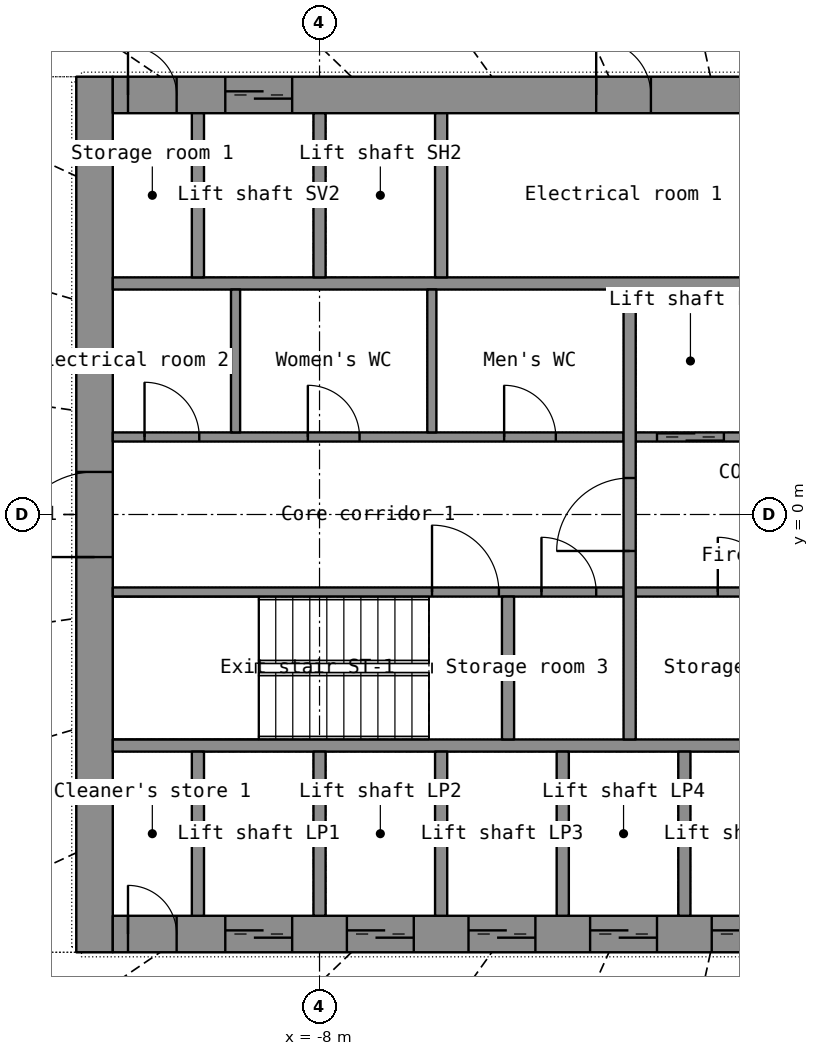
"""IFC4 building model, lengths in metres.
Left out: names, types, materials, properties, quantities, classifications, styles, units other than length and angle.
Written with IfcOpenShell. Run it as: python <this file> out.ifc"""

import sys

from ifc_helpers import new_model, si_unit, direction, frame, frame_2d, origin, place, context, subcontext, project, spatial, rectangle, extrude, element, fill, save


model = new_model("IFC4")
c1 = context("Model", 3, precision=1e-05, world=origin(), true_north=direction((0.0, 1.0)))
c2 = subcontext(c1, "Body", "Model", "MODEL_VIEW")
j1 = project(units=[si_unit("LENGTHUNIT", "METRE"), si_unit("PLANEANGLEUNIT", "RADIAN")], contexts=[c1])
p1 = place(None, origin())
s1 = spatial("IfcSite", under=j1, at=p1, CompositionType="ELEMENT")
p2 = place(p1, origin())
s2 = spatial("IfcBuilding", under=s1, at=p2, CompositionType="ELEMENT")
p3 = place(p2, frame((0.0, 0.0, 74.1)))
s3 = spatial("IfcBuildingStorey", under=s2, at=p3, CompositionType="ELEMENT", Elevation=74.1)
p4 = place(p3, frame((-11.7, -7.2, 0.0), z_axis=(0.0, 0.0, 1.0), x_axis=(0.0, 1.0, 0.0)))
e1 = element("IfcWall", 1, at=p4, inside=s3, PredefinedType="SHEAR", context=c2, shape_type="SweptSolid", body=[
    extrude(rectangle(XDim=14.4, YDim=0.6, at=frame_2d((7.2, 0.0))), origin(), (0.0, 0.0, 1.0), 3.3),
])
p5 = place(p4, frame((6.5, 0.0, 0.0)))
e2 = element("IfcOpeningElement", 2, at=p5, cuts=e1, PredefinedType="OPENING", context=c2, shape_type="SweptSolid", body=[
    extrude(rectangle(XDim=1.4, YDim=2.2, at=frame_2d((0.7, 1.1))), frame((0.0, 0.31, 0.0), z_axis=(0.0, -1.0, 0.0), x_axis=(1.0, 0.0, 0.0)), (0.0, 0.0, 1.0), 0.62),
])
p6 = place(p3, frame((-11.4, -6.9, 0.0), z_axis=(0.0, 0.0, 1.0), x_axis=(1.0, 0.0, 0.0)))
e3 = element("IfcWall", 3, at=p6, inside=s3, PredefinedType="SHEAR", context=c2, shape_type="SweptSolid", body=[
    extrude(rectangle(XDim=22.8, YDim=0.6, at=frame_2d((11.4, 0.0))), origin(), (0.0, 0.0, 1.0), 3.3),
])
p7 = place(p6, frame((1.85, 0.0, 0.0)))
e4 = element("IfcOpeningElement", 4, at=p7, cuts=e3, PredefinedType="OPENING", context=c2, shape_type="SweptSolid", body=[
    extrude(rectangle(XDim=1.1, YDim=2.2, at=frame_2d((0.55, 1.1))), frame((0.0, 0.31, 0.0), z_axis=(0.0, -1.0, 0.0), x_axis=(1.0, 0.0, 0.0)), (0.0, 0.0, 1.0), 0.62),
])
p8 = place(p6, frame((3.85, 0.0, 0.0)))
e5 = element("IfcOpeningElement", 5, at=p8, cuts=e3, PredefinedType="OPENING", context=c2, shape_type="SweptSolid", body=[
    extrude(rectangle(XDim=1.1, YDim=2.2, at=frame_2d((0.55, 1.1))), frame((0.0, 0.31, 0.0), z_axis=(0.0, -1.0, 0.0), x_axis=(1.0, 0.0, 0.0)), (0.0, 0.0, 1.0), 0.62),
])
p9 = place(p6, frame((5.85, 0.0, 0.0)))
e6 = element("IfcOpeningElement", 6, at=p9, cuts=e3, PredefinedType="OPENING", context=c2, shape_type="SweptSolid", body=[
    extrude(rectangle(XDim=1.1, YDim=2.2, at=frame_2d((0.55, 1.1))), frame((0.0, 0.31, 0.0), z_axis=(0.0, -1.0, 0.0), x_axis=(1.0, 0.0, 0.0)), (0.0, 0.0, 1.0), 0.62),
])
p10 = place(p6, frame((7.85, 0.0, 0.0)))
e7 = element("IfcOpeningElement", 7, at=p10, cuts=e3, PredefinedType="OPENING", context=c2, shape_type="SweptSolid", body=[
    extrude(rectangle(XDim=1.1, YDim=2.2, at=frame_2d((0.55, 1.1))), frame((0.0, 0.31, 0.0), z_axis=(0.0, -1.0, 0.0), x_axis=(1.0, 0.0, 0.0)), (0.0, 0.0, 1.0), 0.62),
])
p11 = place(p6, frame((9.85, 0.0, 0.0)))
e8 = element("IfcOpeningElement", 8, at=p11, cuts=e3, PredefinedType="OPENING", context=c2, shape_type="SweptSolid", body=[
    extrude(rectangle(XDim=1.1, YDim=2.2, at=frame_2d((0.55, 1.1))), frame((0.0, 0.31, 0.0), z_axis=(0.0, -1.0, 0.0), x_axis=(1.0, 0.0, 0.0)), (0.0, 0.0, 1.0), 0.62),
])
p12 = place(p6, frame((11.85, 0.0, 0.0)))
e9 = element("IfcOpeningElement", 9, at=p12, cuts=e3, PredefinedType="OPENING", context=c2, shape_type="SweptSolid", body=[
    extrude(rectangle(XDim=1.1, YDim=2.2, at=frame_2d((0.55, 1.1))), frame((0.0, 0.31, 0.0), z_axis=(0.0, -1.0, 0.0), x_axis=(1.0, 0.0, 0.0)), (0.0, 0.0, 1.0), 0.62),
])
p13 = place(p6, frame((13.85, 0.0, 0.0)))
e10 = element("IfcOpeningElement", 10, at=p13, cuts=e3, PredefinedType="OPENING", context=c2, shape_type="SweptSolid", body=[
    extrude(rectangle(XDim=1.1, YDim=2.2, at=frame_2d((0.55, 1.1))), frame((0.0, 0.31, 0.0), z_axis=(0.0, -1.0, 0.0), x_axis=(1.0, 0.0, 0.0)), (0.0, 0.0, 1.0), 0.62),
])
p14 = place(p6, frame((15.85, 0.0, 0.0)))
e11 = element("IfcOpeningElement", 11, at=p14, cuts=e3, PredefinedType="OPENING", context=c2, shape_type="SweptSolid", body=[
    extrude(rectangle(XDim=1.1, YDim=2.2, at=frame_2d((0.55, 1.1))), frame((0.0, 0.31, 0.0), z_axis=(0.0, -1.0, 0.0), x_axis=(1.0, 0.0, 0.0)), (0.0, 0.0, 1.0), 0.62),
])
p15 = place(p6, frame((19.85, 0.0, 0.0)))
e12 = element("IfcOpeningElement", 12, at=p15, cuts=e3, PredefinedType="OPENING", context=c2, shape_type="SweptSolid", body=[
    extrude(rectangle(XDim=1.1, YDim=2.2, at=frame_2d((0.55, 1.1))), frame((0.0, 0.31, 0.0), z_axis=(0.0, -1.0, 0.0), x_axis=(1.0, 0.0, 0.0)), (0.0, 0.0, 1.0), 0.62),
])
p16 = place(p6, frame((0.25, 0.0, 0.0)))
e13 = element("IfcOpeningElement", 13, at=p16, cuts=e3, PredefinedType="OPENING", context=c2, shape_type="SweptSolid", body=[
    extrude(rectangle(XDim=0.8, YDim=2.05, at=frame_2d((0.4, 1.025))), frame((0.0, 0.31, 0.0), z_axis=(0.0, -1.0, 0.0), x_axis=(1.0, 0.0, 0.0)), (0.0, 0.0, 1.0), 0.62),
])
p17 = place(p6, frame((21.75, 0.0, 0.0)))
e14 = element("IfcOpeningElement", 14, at=p17, cuts=e3, PredefinedType="OPENING", context=c2, shape_type="SweptSolid", body=[
    extrude(rectangle(XDim=0.8, YDim=2.05, at=frame_2d((0.4, 1.025))), frame((0.0, 0.31, 0.0), z_axis=(0.0, -1.0, 0.0), x_axis=(1.0, 0.0, 0.0)), (0.0, 0.0, 1.0), 0.62),
])
p18 = place(p3, frame((-11.4, 6.9, 0.0), z_axis=(0.0, 0.0, 1.0), x_axis=(1.0, 0.0, 0.0)))
e15 = element("IfcWall", 15, at=p18, inside=s3, PredefinedType="SHEAR", context=c2, shape_type="SweptSolid", body=[
    extrude(rectangle(XDim=22.8, YDim=0.6, at=frame_2d((11.4, 0.0))), origin(), (0.0, 0.0, 1.0), 3.3),
])
p19 = place(p18, frame((1.85, 0.0, 0.0)))
e16 = element("IfcOpeningElement", 16, at=p19, cuts=e15, PredefinedType="OPENING", context=c2, shape_type="SweptSolid", body=[
    extrude(rectangle(XDim=1.1, YDim=2.2, at=frame_2d((0.55, 1.1))), frame((0.0, 0.31, 0.0), z_axis=(0.0, -1.0, 0.0), x_axis=(1.0, 0.0, 0.0)), (0.0, 0.0, 1.0), 0.62),
])
p20 = place(p18, frame((7.95, 0.0, 0.0)))
e17 = element("IfcOpeningElement", 17, at=p20, cuts=e15, PredefinedType="OPENING", context=c2, shape_type="SweptSolid", body=[
    extrude(rectangle(XDim=0.9, YDim=2.1, at=frame_2d((0.45, 1.05))), frame((0.0, 0.31, 0.0), z_axis=(0.0, -1.0, 0.0), x_axis=(1.0, 0.0, 0.0)), (0.0, 0.0, 1.0), 0.62),
])
p21 = place(p18, frame((13.95, 0.0, 0.0)))
e18 = element("IfcOpeningElement", 18, at=p21, cuts=e15, PredefinedType="OPENING", context=c2, shape_type="SweptSolid", body=[
    extrude(rectangle(XDim=0.9, YDim=2.1, at=frame_2d((0.45, 1.05))), frame((0.0, 0.31, 0.0), z_axis=(0.0, -1.0, 0.0), x_axis=(1.0, 0.0, 0.0)), (0.0, 0.0, 1.0), 0.62),
])
p22 = place(p18, frame((18.95, 0.0, 0.0)))
e19 = element("IfcOpeningElement", 19, at=p22, cuts=e15, PredefinedType="OPENING", context=c2, shape_type="SweptSolid", body=[
    extrude(rectangle(XDim=0.9, YDim=2.1, at=frame_2d((0.45, 1.05))), frame((0.0, 0.31, 0.0), z_axis=(0.0, -1.0, 0.0), x_axis=(1.0, 0.0, 0.0)), (0.0, 0.0, 1.0), 0.62),
])
p23 = place(p18, frame((0.25, 0.0, 0.0)))
e20 = element("IfcOpeningElement", 20, at=p23, cuts=e15, PredefinedType="OPENING", context=c2, shape_type="SweptSolid", body=[
    extrude(rectangle(XDim=0.8, YDim=2.05, at=frame_2d((0.4, 1.025))), frame((0.0, 0.31, 0.0), z_axis=(0.0, -1.0, 0.0), x_axis=(1.0, 0.0, 0.0)), (0.0, 0.0, 1.0), 0.62),
])
p24 = place(p18, frame((21.75, 0.0, 0.0)))
e21 = element("IfcOpeningElement", 21, at=p24, cuts=e15, PredefinedType="OPENING", context=c2, shape_type="SweptSolid", body=[
    extrude(rectangle(XDim=0.8, YDim=2.05, at=frame_2d((0.4, 1.025))), frame((0.0, 0.31, 0.0), z_axis=(0.0, -1.0, 0.0), x_axis=(1.0, 0.0, 0.0)), (0.0, 0.0, 1.0), 0.62),
])
for number, where, z_axis, x_axis in (
    (22, (-11.4, -3.8, 0.0), (0.0, 0.0, 1.0), (1.0, 0.0, 0.0)),
    (23, (-11.4, 3.8, 0.0), (0.0, 0.0, 1.0), (1.0, 0.0, 0.0)),
):
    element("IfcWall", number, at=place(p3, frame(where, z_axis=z_axis, x_axis=x_axis)), inside=s3, PredefinedType="SHEAR", context=c2, shape_type="SweptSolid", body=[
        extrude(rectangle(XDim=22.8, YDim=0.2, at=frame_2d((11.4, 0.0))), origin(), (0.0, 0.0, 1.0), 3.3),
    ])
for number, where, z_axis, x_axis in (
    (24, (-10.0, -6.6, 0.0), (0.0, 0.0, 1.0), (0.0, 1.0, 0.0)),
    (25, (-8.0, -6.6, 0.0), (0.0, 0.0, 1.0), (0.0, 1.0, 0.0)),
    (26, (-6.0, -6.6, 0.0), (0.0, 0.0, 1.0), (0.0, 1.0, 0.0)),
    (27, (-4.0, -6.6, 0.0), (0.0, 0.0, 1.0), (0.0, 1.0, 0.0)),
    (28, (-2.0, -6.6, 0.0), (0.0, 0.0, 1.0), (0.0, 1.0, 0.0)),
    (29, (-10.0, 3.9, 0.0), (0.0, 0.0, 1.0), (0.0, 1.0, 0.0)),
    (30, (-8.0, 3.9, 0.0), (0.0, 0.0, 1.0), (0.0, 1.0, 0.0)),
    (31, (-6.0, 3.9, 0.0), (0.0, 0.0, 1.0), (0.0, 1.0, 0.0)),
):
    element("IfcWall", number, at=place(p3, frame(where, z_axis=z_axis, x_axis=x_axis)), inside=s3, PredefinedType="SHEAR", context=c2, shape_type="SweptSolid", body=[
        extrude(rectangle(XDim=2.7, YDim=0.2, at=frame_2d((1.35, 0.0))), origin(), (0.0, 0.0, 1.0), 3.3),
    ])
p25 = place(p3, frame((-11.4, -1.275, 0.0), z_axis=(0.0, 0.0, 1.0), x_axis=(1.0, 0.0, 0.0)))
e32 = element("IfcWall", 32, at=p25, inside=s3, PredefinedType="SHEAR", context=c2, shape_type="SweptSolid", body=[
    extrude(rectangle(XDim=8.4, YDim=0.15, at=frame_2d((4.2, 0.0))), origin(), (0.0, 0.0, 1.0), 3.3),
])
p26 = place(p25, frame((5.25, 0.0, 0.0)))
e33 = element("IfcOpeningElement", 33, at=p26, cuts=e32, PredefinedType="OPENING", context=c2, shape_type="SweptSolid", body=[
    extrude(rectangle(XDim=1.1, YDim=2.15, at=frame_2d((0.55, 1.075))), frame((0.0, 0.085, 0.0), z_axis=(0.0, -1.0, 0.0), x_axis=(1.0, 0.0, 0.0)), (0.0, 0.0, 1.0), 0.17),
])
p27 = place(p25, frame((7.05, 0.0, 0.0)))
e34 = element("IfcOpeningElement", 34, at=p27, cuts=e32, PredefinedType="OPENING", context=c2, shape_type="SweptSolid", body=[
    extrude(rectangle(XDim=0.9, YDim=2.1, at=frame_2d((0.45, 1.05))), frame((0.0, 0.085, 0.0), z_axis=(0.0, -1.0, 0.0), x_axis=(1.0, 0.0, 0.0)), (0.0, 0.0, 1.0), 0.17),
])
p28 = place(p3, frame((-2.8, -1.275, 0.0), z_axis=(0.0, 0.0, 1.0), x_axis=(1.0, 0.0, 0.0)))
e35 = element("IfcWall", 35, at=p28, inside=s3, PredefinedType="SHEAR", context=c2, shape_type="SweptSolid", body=[
    extrude(rectangle(XDim=5.6, YDim=0.15, at=frame_2d((2.8, 0.0))), origin(), (0.0, 0.0, 1.0), 3.3),
])
p29 = place(p28, frame((4.15, 0.0, 0.0)))
e36 = element("IfcOpeningElement", 36, at=p29, cuts=e35, PredefinedType="OPENING", context=c2, shape_type="SweptSolid", body=[
    extrude(rectangle(XDim=1.1, YDim=2.2, at=frame_2d((0.55, 1.1))), frame((0.0, 0.085, 0.0), z_axis=(0.0, -1.0, 0.0), x_axis=(1.0, 0.0, 0.0)), (0.0, 0.0, 1.0), 0.17),
])
p30 = place(p28, frame((1.35, 0.0, 0.0)))
e37 = element("IfcOpeningElement", 37, at=p30, cuts=e35, PredefinedType="OPENING", context=c2, shape_type="SweptSolid", body=[
    extrude(rectangle(XDim=0.9, YDim=2.1, at=frame_2d((0.45, 1.05))), frame((0.0, 0.085, 0.0), z_axis=(0.0, -1.0, 0.0), x_axis=(1.0, 0.0, 0.0)), (0.0, 0.0, 1.0), 0.17),
])
p31 = place(p3, frame((-11.4, 1.275, 0.0), z_axis=(0.0, 0.0, 1.0), x_axis=(1.0, 0.0, 0.0)))
e38 = element("IfcWall", 38, at=p31, inside=s3, PredefinedType="PARTITIONING", context=c2, shape_type="SweptSolid", body=[
    extrude(rectangle(XDim=8.4, YDim=0.15, at=frame_2d((4.2, 0.0))), origin(), (0.0, 0.0, 1.0), 3.3),
])
p32 = place(p31, frame((0.522, 0.0, 0.0)))
e39 = element("IfcOpeningElement", 39, at=p32, cuts=e38, PredefinedType="OPENING", context=c2, shape_type="SweptSolid", body=[
    extrude(rectangle(XDim=0.9, YDim=2.1, at=frame_2d((0.45, 1.05))), frame((0.0, 0.085, 0.0), z_axis=(0.0, -1.0, 0.0), x_axis=(1.0, 0.0, 0.0)), (0.0, 0.0, 1.0), 0.17),
])
p33 = place(p31, frame((3.208, 0.0, 0.0)))
e40 = element("IfcOpeningElement", 40, at=p33, cuts=e38, PredefinedType="OPENING", context=c2, shape_type="SweptSolid", body=[
    extrude(rectangle(XDim=0.85, YDim=2.1, at=frame_2d((0.425, 1.05))), frame((0.0, 0.085, 0.0), z_axis=(0.0, -1.0, 0.0), x_axis=(1.0, 0.0, 0.0)), (0.0, 0.0, 1.0), 0.17),
])
p34 = place(p31, frame((6.436, 0.0, 0.0)))
e41 = element("IfcOpeningElement", 41, at=p34, cuts=e38, PredefinedType="OPENING", context=c2, shape_type="SweptSolid", body=[
    extrude(rectangle(XDim=0.85, YDim=2.1, at=frame_2d((0.425, 1.05))), frame((0.0, 0.085, 0.0), z_axis=(0.0, -1.0, 0.0), x_axis=(1.0, 0.0, 0.0)), (0.0, 0.0, 1.0), 0.17),
])
p35 = place(p3, frame((-2.8, 1.275, 0.0), z_axis=(0.0, 0.0, 1.0), x_axis=(1.0, 0.0, 0.0)))
e42 = element("IfcWall", 42, at=p35, inside=s3, PredefinedType="SHEAR", context=c2, shape_type="SweptSolid", body=[
    extrude(rectangle(XDim=5.6, YDim=0.15, at=frame_2d((2.8, 0.0))), origin(), (0.0, 0.0, 1.0), 3.3),
])
p36 = place(p35, frame((0.35, 0.0, 0.0)))
e43 = element("IfcOpeningElement", 43, at=p36, cuts=e42, PredefinedType="OPENING", context=c2, shape_type="SweptSolid", body=[
    extrude(rectangle(XDim=1.1, YDim=2.2, at=frame_2d((0.55, 1.1))), frame((0.0, 0.085, 0.0), z_axis=(0.0, -1.0, 0.0), x_axis=(1.0, 0.0, 0.0)), (0.0, 0.0, 1.0), 0.17),
])
p37 = place(p35, frame((3.35, 0.0, 0.0)))
e44 = element("IfcOpeningElement", 44, at=p37, cuts=e42, PredefinedType="OPENING", context=c2, shape_type="SweptSolid", body=[
    extrude(rectangle(XDim=0.9, YDim=2.1, at=frame_2d((0.45, 1.05))), frame((0.0, 0.085, 0.0), z_axis=(0.0, -1.0, 0.0), x_axis=(1.0, 0.0, 0.0)), (0.0, 0.0, 1.0), 0.17),
])
p38 = place(p3, frame((-2.9, -3.7, 0.0), z_axis=(0.0, 0.0, 1.0), x_axis=(0.0, 1.0, 0.0)))
e45 = element("IfcWall", 45, at=p38, inside=s3, PredefinedType="SHEAR", context=c2, shape_type="SweptSolid", body=[
    extrude(rectangle(XDim=7.4, YDim=0.2, at=frame_2d((3.7, 0.0))), origin(), (0.0, 0.0, 1.0), 3.3),
])
p39 = place(p38, frame((3.1, 0.0, 0.0)))
e46 = element("IfcOpeningElement", 46, at=p39, cuts=e45, PredefinedType="OPENING", context=c2, shape_type="SweptSolid", body=[
    extrude(rectangle(XDim=1.2, YDim=2.2, at=frame_2d((0.6, 1.1))), frame((0.0, 0.11, 0.0), z_axis=(0.0, -1.0, 0.0), x_axis=(1.0, 0.0, 0.0)), (0.0, 0.0, 1.0), 0.22),
])
p40 = place(p3, frame((-4.9, -3.7, 0.0), z_axis=(0.0, 0.0, 1.0), x_axis=(0.0, 1.0, 0.0)))
e47 = element("IfcWall", 47, at=p40, inside=s3, PredefinedType="SHEAR", context=c2, shape_type="SweptSolid", body=[
    extrude(rectangle(XDim=2.35, YDim=0.2, at=frame_2d((1.175, 0.0))), origin(), (0.0, 0.0, 1.0), 3.3),
])
for number, where, z_axis, x_axis in (
    (48, (-9.381, 1.35, 0.0), (0.0, 0.0, 1.0), (0.0, 1.0, 0.0)),
    (49, (-6.153, 1.35, 0.0), (0.0, 0.0, 1.0), (0.0, 1.0, 0.0)),
):
    element("IfcWall", number, at=place(p3, frame(where, z_axis=z_axis, x_axis=x_axis)), inside=s3, PredefinedType="PARTITIONING", context=c2, shape_type="SweptSolid", body=[
        extrude(rectangle(XDim=2.35, YDim=0.15, at=frame_2d((1.175, 0.0))), origin(), (0.0, 0.0, 1.0), 3.3),
    ])
p41 = place(p7, origin())
e50 = element("IfcDoor", 50, at=p41, inside=s3, OperationType="DOUBLE_DOOR_SLIDING", PredefinedType="DOOR", context=c2, shape_type="SweptSolid", body=[
    extrude(rectangle(XDim=1.1, YDim=2.2, at=frame_2d((0.55, 1.1))), frame((0.0, 0.025, 0.0), z_axis=(0.0, -1.0, 0.0), x_axis=(1.0, 0.0, 0.0)), (0.0, 0.0, 1.0), 0.05),
])
fill(e4, e50)
p42 = place(p8, origin())
e51 = element("IfcDoor", 51, at=p42, inside=s3, OperationType="DOUBLE_DOOR_SLIDING", PredefinedType="DOOR", context=c2, shape_type="SweptSolid", body=[
    extrude(rectangle(XDim=1.1, YDim=2.2, at=frame_2d((0.55, 1.1))), frame((0.0, 0.025, 0.0), z_axis=(0.0, -1.0, 0.0), x_axis=(1.0, 0.0, 0.0)), (0.0, 0.0, 1.0), 0.05),
])
fill(e5, e51)
p43 = place(p9, origin())
e52 = element("IfcDoor", 52, at=p43, inside=s3, OperationType="DOUBLE_DOOR_SLIDING", PredefinedType="DOOR", context=c2, shape_type="SweptSolid", body=[
    extrude(rectangle(XDim=1.1, YDim=2.2, at=frame_2d((0.55, 1.1))), frame((0.0, 0.025, 0.0), z_axis=(0.0, -1.0, 0.0), x_axis=(1.0, 0.0, 0.0)), (0.0, 0.0, 1.0), 0.05),
])
fill(e6, e52)
p44 = place(p10, origin())
e53 = element("IfcDoor", 53, at=p44, inside=s3, OperationType="DOUBLE_DOOR_SLIDING", PredefinedType="DOOR", context=c2, shape_type="SweptSolid", body=[
    extrude(rectangle(XDim=1.1, YDim=2.2, at=frame_2d((0.55, 1.1))), frame((0.0, 0.025, 0.0), z_axis=(0.0, -1.0, 0.0), x_axis=(1.0, 0.0, 0.0)), (0.0, 0.0, 1.0), 0.05),
])
fill(e7, e53)
p45 = place(p11, origin())
e54 = element("IfcDoor", 54, at=p45, inside=s3, OperationType="DOUBLE_DOOR_SLIDING", PredefinedType="DOOR", context=c2, shape_type="SweptSolid", body=[
    extrude(rectangle(XDim=1.1, YDim=2.2, at=frame_2d((0.55, 1.1))), frame((0.0, 0.025, 0.0), z_axis=(0.0, -1.0, 0.0), x_axis=(1.0, 0.0, 0.0)), (0.0, 0.0, 1.0), 0.05),
])
fill(e8, e54)
p46 = place(p16, origin())
e55 = element("IfcDoor", 55, at=p46, inside=s3, OperationType="SINGLE_SWING_LEFT", PredefinedType="DOOR", context=c2, shape_type="SweptSolid", body=[
    extrude(rectangle(XDim=0.8, YDim=2.05, at=frame_2d((0.4, 1.025))), frame((0.0, 0.025, 0.0), z_axis=(0.0, -1.0, 0.0), x_axis=(1.0, 0.0, 0.0)), (0.0, 0.0, 1.0), 0.05),
])
fill(e13, e55)
p47 = place(p19, origin())
e56 = element("IfcDoor", 56, at=p47, inside=s3, OperationType="DOUBLE_DOOR_SLIDING", PredefinedType="DOOR", context=c2, shape_type="SweptSolid", body=[
    extrude(rectangle(XDim=1.1, YDim=2.2, at=frame_2d((0.55, 1.1))), frame((0.0, 0.025, 0.0), z_axis=(0.0, -1.0, 0.0), x_axis=(1.0, 0.0, 0.0)), (0.0, 0.0, 1.0), 0.05),
])
fill(e16, e56)
p48 = place(p20, origin())
e57 = element("IfcDoor", 57, at=p48, inside=s3, OperationType="SINGLE_SWING_LEFT", PredefinedType="DOOR", context=c2, shape_type="SweptSolid", body=[
    extrude(rectangle(XDim=0.9, YDim=2.1, at=frame_2d((0.45, 1.05))), frame((0.0, 0.025, 0.0), z_axis=(0.0, -1.0, 0.0), x_axis=(1.0, 0.0, 0.0)), (0.0, 0.0, 1.0), 0.05),
])
fill(e17, e57)
p49 = place(p23, origin())
e58 = element("IfcDoor", 58, at=p49, inside=s3, OperationType="SINGLE_SWING_LEFT", PredefinedType="DOOR", context=c2, shape_type="SweptSolid", body=[
    extrude(rectangle(XDim=0.8, YDim=2.05, at=frame_2d((0.4, 1.025))), frame((0.0, 0.025, 0.0), z_axis=(0.0, -1.0, 0.0), x_axis=(1.0, 0.0, 0.0)), (0.0, 0.0, 1.0), 0.05),
])
fill(e20, e58)
p50 = place(p5, origin())
e59 = element("IfcDoor", 59, at=p50, inside=s3, OperationType="DOUBLE_DOOR_SINGLE_SWING", PredefinedType="DOOR", context=c2, shape_type="SweptSolid", body=[
    extrude(rectangle(XDim=1.4, YDim=2.2, at=frame_2d((0.7, 1.1))), frame((0.0, 0.025, 0.0), z_axis=(0.0, -1.0, 0.0), x_axis=(1.0, 0.0, 0.0)), (0.0, 0.0, 1.0), 0.05),
])
fill(e2, e59)
p51 = place(p39, origin())
e60 = element("IfcDoor", 60, at=p51, inside=s3, OperationType="SINGLE_SWING_LEFT", PredefinedType="DOOR", context=c2, shape_type="SweptSolid", body=[
    extrude(rectangle(XDim=1.2, YDim=2.2, at=frame_2d((0.6, 1.1))), frame((0.0, 0.025, 0.0), z_axis=(0.0, -1.0, 0.0), x_axis=(1.0, 0.0, 0.0)), (0.0, 0.0, 1.0), 0.05),
])
fill(e46, e60)
p52 = place(p36, origin())
e61 = element("IfcDoor", 61, at=p52, inside=s3, OperationType="DOUBLE_DOOR_SLIDING", PredefinedType="DOOR", context=c2, shape_type="SweptSolid", body=[
    extrude(rectangle(XDim=1.1, YDim=2.2, at=frame_2d((0.55, 1.1))), frame((0.0, 0.025, 0.0), z_axis=(0.0, -1.0, 0.0), x_axis=(1.0, 0.0, 0.0)), (0.0, 0.0, 1.0), 0.05),
])
fill(e43, e61)
p53 = place(p26, origin())
e62 = element("IfcDoor", 62, at=p53, inside=s3, OperationType="SINGLE_SWING_LEFT", PredefinedType="DOOR", context=c2, shape_type="SweptSolid", body=[
    extrude(rectangle(XDim=1.1, YDim=2.15, at=frame_2d((0.55, 1.075))), frame((0.0, 0.025, 0.0), z_axis=(0.0, -1.0, 0.0), x_axis=(1.0, 0.0, 0.0)), (0.0, 0.0, 1.0), 0.05),
])
fill(e33, e62)
p54 = place(p32, origin())
e63 = element("IfcDoor", 63, at=p54, inside=s3, OperationType="SINGLE_SWING_LEFT", PredefinedType="DOOR", context=c2, shape_type="SweptSolid", body=[
    extrude(rectangle(XDim=0.9, YDim=2.1, at=frame_2d((0.45, 1.05))), frame((0.0, 0.025, 0.0), z_axis=(0.0, -1.0, 0.0), x_axis=(1.0, 0.0, 0.0)), (0.0, 0.0, 1.0), 0.05),
])
fill(e39, e63)
p55 = place(p33, origin())
e64 = element("IfcDoor", 64, at=p55, inside=s3, OperationType="SINGLE_SWING_LEFT", PredefinedType="DOOR", context=c2, shape_type="SweptSolid", body=[
    extrude(rectangle(XDim=0.85, YDim=2.1, at=frame_2d((0.425, 1.05))), frame((0.0, 0.025, 0.0), z_axis=(0.0, -1.0, 0.0), x_axis=(1.0, 0.0, 0.0)), (0.0, 0.0, 1.0), 0.05),
])
fill(e40, e64)
p56 = place(p34, origin())
e65 = element("IfcDoor", 65, at=p56, inside=s3, OperationType="SINGLE_SWING_LEFT", PredefinedType="DOOR", context=c2, shape_type="SweptSolid", body=[
    extrude(rectangle(XDim=0.85, YDim=2.1, at=frame_2d((0.425, 1.05))), frame((0.0, 0.025, 0.0), z_axis=(0.0, -1.0, 0.0), x_axis=(1.0, 0.0, 0.0)), (0.0, 0.0, 1.0), 0.05),
])
fill(e41, e65)
p57 = place(p30, origin())
e66 = element("IfcDoor", 66, at=p57, inside=s3, OperationType="SINGLE_SWING_LEFT", PredefinedType="DOOR", context=c2, shape_type="SweptSolid", body=[
    extrude(rectangle(XDim=0.9, YDim=2.1, at=frame_2d((0.45, 1.05))), frame((0.0, 0.025, 0.0), z_axis=(0.0, -1.0, 0.0), x_axis=(1.0, 0.0, 0.0)), (0.0, 0.0, 1.0), 0.05),
])
fill(e37, e66)
p58 = place(p27, origin())
e67 = element("IfcDoor", 67, at=p58, inside=s3, OperationType="SINGLE_SWING_LEFT", PredefinedType="DOOR", context=c2, shape_type="SweptSolid", body=[
    extrude(rectangle(XDim=0.9, YDim=2.1, at=frame_2d((0.45, 1.05))), frame((0.0, 0.025, 0.0), z_axis=(0.0, -1.0, 0.0), x_axis=(1.0, 0.0, 0.0)), (0.0, 0.0, 1.0), 0.05),
])
fill(e34, e67)
save(model, sys.argv[1])
